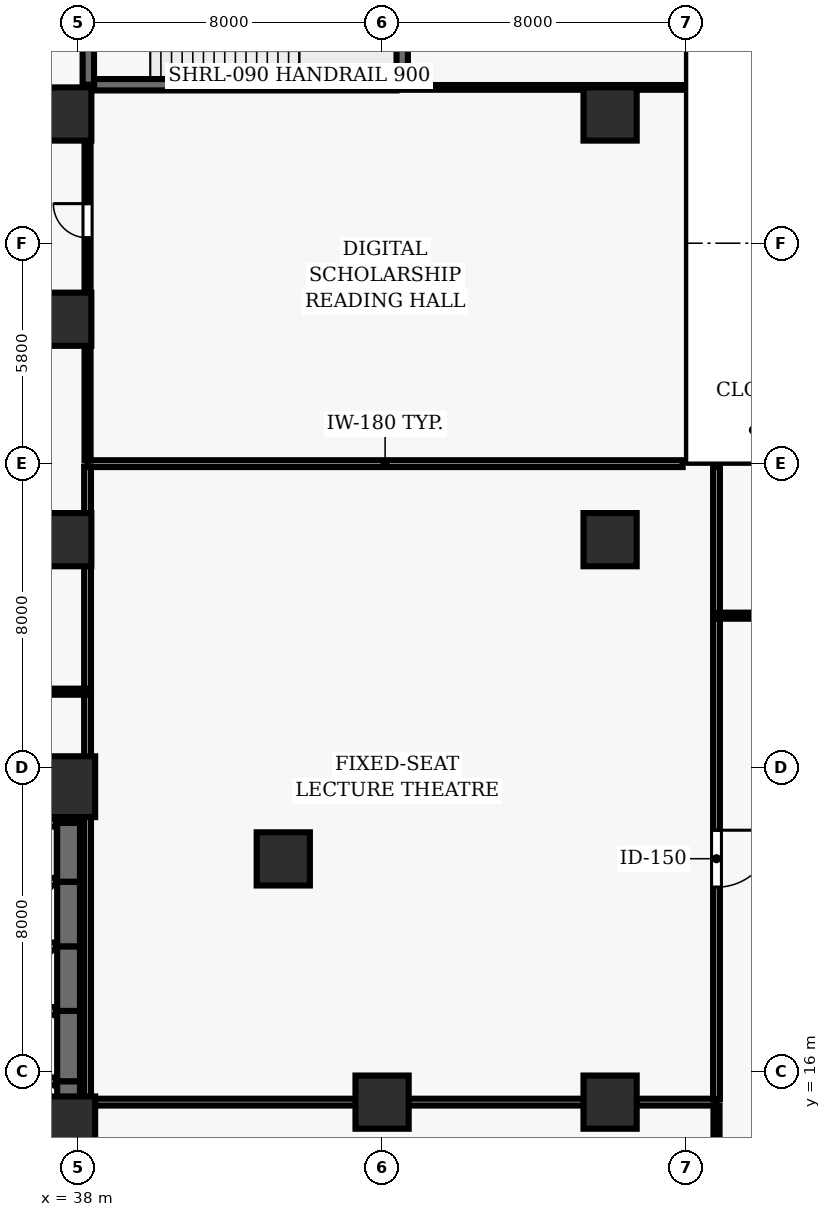
"""IFC4 building model, lengths in metres.
Left out: names, types, materials, properties, quantities, classifications, styles, units other than length and angle.
Written with IfcOpenShell. Run it as: python <this file> out.ifc"""

import sys

from ifc_helpers import new_model, si_unit, direction, frame, frame_2d, origin, origin_2d, place, context, subcontext, project, spatial, rectangle, extrude, element, fill, save


model = new_model("IFC4")
c1 = context("Model", 3, precision=1e-05, world=origin(), true_north=direction((0.0, 1.0)))
c2 = subcontext(c1, "Body", "Model", "MODEL_VIEW")
j1 = project(units=[si_unit("LENGTHUNIT", "METRE"), si_unit("PLANEANGLEUNIT", "RADIAN")], contexts=[c1])
p1 = place(None, origin())
s1 = spatial("IfcSite", under=j1, at=p1, CompositionType="ELEMENT")
p2 = place(p1, origin())
s2 = spatial("IfcBuilding", under=s1, at=p2, CompositionType="ELEMENT")
p3 = place(p2, frame((0.0, 0.0, 5.2)))
s3 = spatial("IfcBuildingStorey", under=s2, at=p3, CompositionType="ELEMENT", Elevation=5.2)
for number, where, z_axis, x_axis in (
    (1, (37.65, 14.55, 0.0), (0.0, 0.0, 1.0), (1.0, 0.0, 0.0)),
    (2, (37.65, 23.5, 0.0), (0.0, 0.0, 1.0), (1.0, 0.0, 0.0)),
):
    element("IfcColumn", number, at=place(p3, frame(where, z_axis=z_axis, x_axis=x_axis)), inside=s3, PredefinedType="COLUMN", context=c2, shape_type="SweptSolid", body=[
        extrude(rectangle(XDim=1.6, YDim=1.6, at=origin_2d()), origin(), (0.0, 0.0, 1.0), 5.2),
    ])
for number, where, z_axis, x_axis in (
    (3, (46.0, 15.2, 0.0), (0.0, 0.0, 1.0), (1.0, 0.0, 0.0)),
    (4, (52.0, 15.2, 0.0), (0.0, 0.0, 1.0), (1.0, 0.0, 0.0)),
    (5, (37.65, 30.0, 0.0), (0.0, 0.0, 1.0), (1.0, 0.0, 0.0)),
    (6, (37.65, 35.8, 0.0), (0.0, 0.0, 1.0), (1.0, 0.0, 0.0)),
    (7, (37.65, 41.2, 0.0), (0.0, 0.0, 1.0), (1.0, 0.0, 0.0)),
    (8, (43.4, 21.6, 0.0), (0.0, 0.0, 1.0), (1.0, 0.0, 0.0)),
    (9, (52.0, 30.0, 0.0), (0.0, 0.0, 1.0), (1.0, 0.0, 0.0)),
    (10, (52.0, 41.2, 0.0), (0.0, 0.0, 1.0), (1.0, 0.0, 0.0)),
):
    element("IfcColumn", number, at=place(p3, frame(where, z_axis=z_axis, x_axis=x_axis)), inside=s3, PredefinedType="COLUMN", context=c2, shape_type="SweptSolid", body=[
        extrude(rectangle(XDim=1.4, YDim=1.4, at=origin_2d()), origin(), (0.0, 0.0, 1.0), 5.2),
    ])
p4 = place(p3, frame((38.42, 41.97, 0.0), z_axis=(0.0, 0.0, 1.0), x_axis=(1.0, 0.0, 0.0)))
e11 = element("IfcWall", 11, at=p4, inside=s3, PredefinedType="SHEAR", context=c2, shape_type="SweptSolid", body=[
    extrude(rectangle(XDim=7.96, YDim=0.3, at=frame_2d((3.98, 0.0))), origin(), (0.0, 0.0, 1.0), 4.92),
])
p5 = place(p3, frame((46.53, 41.97, 0.0), z_axis=(0.0, 0.0, 1.0), x_axis=(0.0, 1.0, 0.0)))
e12 = element("IfcWall", 12, at=p5, inside=s3, PredefinedType="SHEAR", context=c2, shape_type="SweptSolid", body=[
    extrude(rectangle(XDim=3.41, YDim=0.3, at=frame_2d((1.705, 0.0))), origin(), (0.0, 0.0, 1.0), 4.92),
])
p6 = place(p3, frame((38.27, 45.92, 0.0), z_axis=(0.0, 0.0, 1.0), x_axis=(0.0, -1.0, 0.0)))
e13 = element("IfcWall", 13, at=p6, inside=s3, PredefinedType="SHEAR", context=c2, shape_type="SweptSolid", body=[
    extrude(rectangle(XDim=3.95, YDim=0.3, at=frame_2d((1.975, 0.0))), origin(), (0.0, 0.0, 1.0), 4.92),
])
p7 = place(p6, frame((1.67, 0.0, 0.0)))
e14 = element("IfcOpeningElement", 14, at=p7, cuts=e13, PredefinedType="OPENING", context=c2, shape_type="SweptSolid", body=[
    extrude(rectangle(XDim=1.15, YDim=2.15, at=frame_2d((0.575, 1.075))), frame((0.0, 0.16, 0.0), z_axis=(0.0, -1.0, 0.0), x_axis=(1.0, 0.0, 0.0)), (0.0, 0.0, 1.0), 0.32),
])
p8 = place(p3, frame((37.75, 13.9, 0.0), z_axis=(0.0, 0.0, 1.0), x_axis=(0.0, 1.0, 0.0)))
e15 = element("IfcWall", 15, at=p8, inside=s3, PredefinedType="SHEAR", context=c2, shape_type="SweptSolid", body=[
    extrude(rectangle(XDim=1.85, YDim=0.6, at=frame_2d((0.925, 0.0))), origin(), (0.0, 0.0, 1.0), 4.92),
])
p9 = place(p3, frame((37.42, 15.75, 0.0), z_axis=(0.0, 0.0, 1.0), x_axis=(-1.0, 0.0, 0.0)))
e16 = element("IfcWall", 16, at=p9, inside=s3, PredefinedType="SOLIDWALL", context=c2, shape_type="SweptSolid", body=[
    extrude(rectangle(XDim=2.14, YDim=0.2, at=frame_2d((1.07, 0.0))), origin(), (0.0, 0.0, 1.0), 4.92),
])
p10 = place(p3, frame((37.75, 15.75, 0.0), z_axis=(0.0, 0.0, 1.0), x_axis=(0.0, 1.0, 0.0)))
e17 = element("IfcWall", 17, at=p10, inside=s3, PredefinedType="SHEAR", context=c2, shape_type="SweptSolid", body=[
    extrude(rectangle(XDim=1.85, YDim=0.6, at=frame_2d((0.925, 0.0))), origin(), (0.0, 0.0, 1.0), 4.92),
])
p11 = place(p3, frame((37.42, 17.6, 0.0), z_axis=(0.0, 0.0, 1.0), x_axis=(-1.0, 0.0, 0.0)))
e18 = element("IfcWall", 18, at=p11, inside=s3, PredefinedType="SOLIDWALL", context=c2, shape_type="SweptSolid", body=[
    extrude(rectangle(XDim=2.14, YDim=0.2, at=frame_2d((1.07, 0.0))), origin(), (0.0, 0.0, 1.0), 4.92),
])
p12 = place(p3, frame((37.75, 17.6, 0.0), z_axis=(0.0, 0.0, 1.0), x_axis=(0.0, 1.0, 0.0)))
e19 = element("IfcWall", 19, at=p12, inside=s3, PredefinedType="SHEAR", context=c2, shape_type="SweptSolid", body=[
    extrude(rectangle(XDim=1.7, YDim=0.6, at=frame_2d((0.85, 0.0))), origin(), (0.0, 0.0, 1.0), 4.92),
])
p13 = place(p3, frame((37.42, 19.3, 0.0), z_axis=(0.0, 0.0, 1.0), x_axis=(-1.0, 0.0, 0.0)))
e20 = element("IfcWall", 20, at=p13, inside=s3, PredefinedType="SOLIDWALL", context=c2, shape_type="SweptSolid", body=[
    extrude(rectangle(XDim=2.14, YDim=0.2, at=frame_2d((1.07, 0.0))), origin(), (0.0, 0.0, 1.0), 4.92),
])
p14 = place(p3, frame((37.75, 19.3, 0.0), z_axis=(0.0, 0.0, 1.0), x_axis=(0.0, 1.0, 0.0)))
e21 = element("IfcWall", 21, at=p14, inside=s3, PredefinedType="SHEAR", context=c2, shape_type="SweptSolid", body=[
    extrude(rectangle(XDim=1.7, YDim=0.6, at=frame_2d((0.85, 0.0))), origin(), (0.0, 0.0, 1.0), 4.92),
])
p15 = place(p3, frame((37.42, 21.0, 0.0), z_axis=(0.0, 0.0, 1.0), x_axis=(-1.0, 0.0, 0.0)))
e22 = element("IfcWall", 22, at=p15, inside=s3, PredefinedType="SOLIDWALL", context=c2, shape_type="SweptSolid", body=[
    extrude(rectangle(XDim=2.14, YDim=0.2, at=frame_2d((1.07, 0.0))), origin(), (0.0, 0.0, 1.0), 4.92),
])
p16 = place(p3, frame((37.75, 21.0, 0.0), z_axis=(0.0, 0.0, 1.0), x_axis=(0.0, 1.0, 0.0)))
e23 = element("IfcWall", 23, at=p16, inside=s3, PredefinedType="SHEAR", context=c2, shape_type="SweptSolid", body=[
    extrude(rectangle(XDim=1.55, YDim=0.6, at=frame_2d((0.775, 0.0))), origin(), (0.0, 0.0, 1.0), 4.92),
])
p17 = place(p3, frame((37.42, 22.55, 0.0), z_axis=(0.0, 0.0, 1.0), x_axis=(-1.0, 0.0, 0.0)))
e24 = element("IfcWall", 24, at=p17, inside=s3, PredefinedType="SOLIDWALL", context=c2, shape_type="SweptSolid", body=[
    extrude(rectangle(XDim=2.14, YDim=0.2, at=frame_2d((1.07, 0.0))), origin(), (0.0, 0.0, 1.0), 4.92),
])
p18 = place(p3, frame((37.75, 22.55, 0.0), z_axis=(0.0, 0.0, 1.0), x_axis=(0.0, 1.0, 0.0)))
e25 = element("IfcWall", 25, at=p18, inside=s3, PredefinedType="SHEAR", context=c2, shape_type="SweptSolid", body=[
    extrude(rectangle(XDim=1.5, YDim=0.6, at=frame_2d((0.75, 0.0))), origin(), (0.0, 0.0, 1.0), 4.92),
])
p19 = place(p3, frame((37.42, 24.05, 0.0), z_axis=(0.0, 0.0, 1.0), x_axis=(-1.0, 0.0, 0.0)))
e26 = element("IfcWall", 26, at=p19, inside=s3, PredefinedType="SOLIDWALL", context=c2, shape_type="SweptSolid", body=[
    extrude(rectangle(XDim=2.14, YDim=0.2, at=frame_2d((1.07, 0.0))), origin(), (0.0, 0.0, 1.0), 4.92),
])
p20 = place(p3, frame((35.15, 26.0, 0.0), z_axis=(0.0, 0.0, 1.0), x_axis=(1.0, 0.0, 0.0)))
e27 = element("IfcWall", 27, at=p20, inside=s3, PredefinedType="PARTITIONING", context=c2, shape_type="SweptSolid", body=[
    extrude(rectangle(XDim=3.1, YDim=0.16, at=frame_2d((1.55, 0.0))), origin(), (0.0, 0.0, 1.0), 4.92),
])
p21 = place(p3, frame((38.25, 15.2, 0.0), z_axis=(0.0, 0.0, 1.0), x_axis=(1.0, 0.0, 0.0)))
e28 = element("IfcWall", 28, at=p21, inside=s3, PredefinedType="PARTITIONING", context=c2, shape_type="SweptSolid", body=[
    extrude(rectangle(XDim=16.55, YDim=0.18, at=frame_2d((8.275, 0.0))), origin(), (0.0, 0.0, 1.0), 4.065),
])
p22 = place(p3, frame((38.25, 32.0, 0.0), z_axis=(0.0, 0.0, 1.0), x_axis=(1.0, 0.0, 0.0)))
e29 = element("IfcWall", 29, at=p22, inside=s3, PredefinedType="PARTITIONING", context=c2, shape_type="SweptSolid", body=[
    extrude(rectangle(XDim=15.66, YDim=0.18, at=frame_2d((7.83, 0.0))), origin(), (0.0, 0.0, 1.0), 4.92),
])
p23 = place(p3, frame((53.91, 41.9, 0.0), z_axis=(0.0, 0.0, 1.0), x_axis=(-1.0, 0.0, 0.0)))
e30 = element("IfcWall", 30, at=p23, inside=s3, PredefinedType="PARTITIONING", context=c2, shape_type="SweptSolid", body=[
    extrude(rectangle(XDim=7.53, YDim=0.125, at=frame_2d((3.765, 0.0))), origin(), (0.0, 0.0, 1.0), 4.92),
])
p24 = place(p3, frame((58.45, 28.0, 0.0), z_axis=(0.0, 0.0, 1.0), x_axis=(-1.0, 0.0, 0.0)))
e31 = element("IfcWall", 31, at=p24, inside=s3, PredefinedType="PARTITIONING", context=c2, shape_type="SweptSolid", body=[
    extrude(rectangle(XDim=3.65, YDim=0.16, at=frame_2d((1.825, 0.0))), origin(), (0.0, 0.0, 1.0), 4.92),
])
p25 = place(p3, frame((38.25, 25.925, 0.0), z_axis=(0.0, 0.0, 1.0), x_axis=(0.0, -1.0, 0.0)))
e32 = element("IfcWall", 32, at=p25, inside=s3, PredefinedType="PARTITIONING", context=c2, shape_type="SweptSolid", body=[
    extrude(rectangle(XDim=10.64, YDim=0.18, at=frame_2d((5.32, 0.0))), origin(), (0.0, 0.0, 1.0), 4.92),
])
p26 = place(p3, frame((38.25, 26.075, 0.0), z_axis=(0.0, 0.0, 1.0), x_axis=(0.0, 1.0, 0.0)))
e33 = element("IfcWall", 33, at=p26, inside=s3, PredefinedType="PARTITIONING", context=c2, shape_type="SweptSolid", body=[
    extrude(rectangle(XDim=5.84, YDim=0.18, at=frame_2d((2.92, 0.0))), origin(), (0.0, 0.0, 1.0), 4.92),
])
p27 = place(p3, frame((38.25, 32.085, 0.0), z_axis=(0.0, 0.0, 1.0), x_axis=(0.0, 1.0, 0.0)))
e34 = element("IfcWall", 34, at=p27, inside=s3, PredefinedType="PARTITIONING", context=c2, shape_type="SweptSolid", body=[
    extrude(rectangle(XDim=9.815, YDim=0.16, at=frame_2d((4.907, 0.0))), origin(), (0.0, 0.0, 1.0), 4.92),
])
p28 = place(p27, frame((5.857, 0.0, 0.0)))
e35 = element("IfcOpeningElement", 35, at=p28, cuts=e34, PredefinedType="OPENING", context=c2, shape_type="SweptSolid", body=[
    extrude(rectangle(XDim=0.9, YDim=2.1, at=frame_2d((0.45, 1.05))), frame((0.0, 0.09, 0.0), z_axis=(0.0, -1.0, 0.0), x_axis=(1.0, 0.0, 0.0)), (0.0, 0.0, 1.0), 0.18),
])
p29 = place(p3, frame((54.8, 15.115, 0.0), z_axis=(0.0, 0.0, 1.0), x_axis=(0.0, -1.0, 0.0)))
e36 = element("IfcWall", 36, at=p29, inside=s3, PredefinedType="PARTITIONING", context=c2, shape_type="SweptSolid", body=[
    extrude(rectangle(XDim=4.39, YDim=0.16, at=frame_2d((2.195, 0.0))), origin(), (0.0, 0.0, 1.0), 4.92),
])
p30 = place(p3, frame((54.8, 28.075, 0.0), z_axis=(0.0, 0.0, 1.0), x_axis=(0.0, 1.0, 0.0)))
e37 = element("IfcWall", 37, at=p30, inside=s3, PredefinedType="PARTITIONING", context=c2, shape_type="SweptSolid", body=[
    extrude(rectangle(XDim=3.835, YDim=0.18, at=frame_2d((1.917, 0.0))), origin(), (0.0, 0.0, 1.0), 4.451),
])
p31 = place(p3, frame((54.8, 27.925, 0.0), z_axis=(0.0, 0.0, 1.0), x_axis=(0.0, -1.0, 0.0)))
e38 = element("IfcWall", 38, at=p31, inside=s3, PredefinedType="PARTITIONING", context=c2, shape_type="SweptSolid", body=[
    extrude(rectangle(XDim=12.64, YDim=0.18, at=frame_2d((6.32, 0.0))), origin(), (0.0, 0.0, 1.0), 4.451),
])
p32 = place(p31, frame((5.57, 0.0, 0.0)))
e39 = element("IfcOpeningElement", 39, at=p32, cuts=e38, PredefinedType="OPENING", context=c2, shape_type="SweptSolid", body=[
    extrude(rectangle(XDim=1.5, YDim=2.2, at=frame_2d((0.75, 1.1))), frame((0.0, 0.1, 0.0), z_axis=(0.0, -1.0, 0.0), x_axis=(1.0, 0.0, 0.0)), (0.0, 0.0, 1.0), 0.2),
])
p33 = place(p32, origin())
e40 = element("IfcDoor", 40, at=p33, inside=s3, OperationType="SINGLE_SWING_LEFT", PredefinedType="DOOR", context=c2, shape_type="SweptSolid", body=[
    extrude(rectangle(XDim=1.5, YDim=2.2, at=frame_2d((0.75, 1.1))), frame((0.0, 0.025, 0.0), z_axis=(0.0, -1.0, 0.0), x_axis=(1.0, 0.0, 0.0)), (0.0, 0.0, 1.0), 0.05),
])
fill(e39, e40)
p34 = place(p28, origin())
e41 = element("IfcDoor", 41, at=p34, inside=s3, OperationType="SINGLE_SWING_RIGHT", PredefinedType="DOOR", context=c2, shape_type="SweptSolid", body=[
    extrude(rectangle(XDim=0.9, YDim=2.1, at=frame_2d((0.45, 1.05))), frame((0.0, 0.025, 0.0), z_axis=(0.0, -1.0, 0.0), x_axis=(1.0, 0.0, 0.0)), (0.0, 0.0, 1.0), 0.05),
])
fill(e35, e41)
save(model, sys.argv[1])
